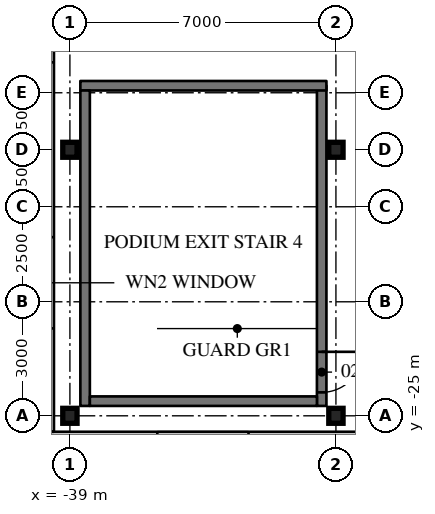
"""IFC4 building model, lengths in metres.
Left out: names, types, materials, properties, quantities, classifications, styles, units other than length and angle.
Written with IfcOpenShell. Run it as: python <this file> out.ifc"""

import sys

from ifc_helpers import new_model, si_unit, direction, frame, frame_2d, origin, origin_2d, place, context, subcontext, project, spatial, rectangle, i_section, extrude, element, fill, save


model = new_model("IFC4")
c1 = context("Model", 3, precision=1e-05, world=origin(), true_north=direction((0.0, 1.0)))
c2 = subcontext(c1, "Body", "Model", "MODEL_VIEW")
j1 = project(units=[si_unit("LENGTHUNIT", "METRE"), si_unit("PLANEANGLEUNIT", "RADIAN")], contexts=[c1])
p1 = place(None, origin())
s1 = spatial("IfcSite", under=j1, at=p1, CompositionType="ELEMENT")
p2 = place(p1, origin())
s2 = spatial("IfcBuilding", under=s1, at=p2, CompositionType="ELEMENT")
p3 = place(p2, frame((0.0, 0.0, 11.0)))
s3 = spatial("IfcBuildingStorey", under=s2, at=p3, CompositionType="ELEMENT", Elevation=11.0)
for number, where, z_axis, x_axis in (
    (1, (-39.0, -25.0, 0.0), (0.0, 0.0, 1.0), (0.0, 1.0, 0.0)),
    (2, (-39.0, -18.0, 0.0), (0.0, 0.0, 1.0), (0.0, 1.0, 0.0)),
    (3, (-32.0, -25.0, 0.0), (0.0, 0.0, 1.0), (0.0, 1.0, 0.0)),
    (4, (-32.0, -18.0, 0.0), (0.0, 0.0, 1.0), (0.0, 1.0, 0.0)),
):
    element("IfcColumn", number, at=place(p3, frame(where, z_axis=z_axis, x_axis=x_axis)), inside=s3, PredefinedType="COLUMN", context=c2, shape_type="SweptSolid", body=[
        extrude(i_section(OverallWidth=0.394, OverallDepth=0.376, WebThickness=0.017, FlangeThickness=0.028, at=origin_2d()), origin(), (0.0, 0.0, 1.0), 5.0),
    ])
p4 = place(p3, frame((-39.82, -25.62, -0.19), z_axis=(0.0, 0.0, 1.0), x_axis=(1.0, 0.0, 0.0)))
e5 = element("IfcWall", 5, at=p4, inside=s3, PredefinedType="SOLIDWALL", context=c2, shape_type="SweptSolid", body=[
    extrude(rectangle(XDim=79.64, YDim=0.4, at=frame_2d((39.82, 0.0))), origin(), (0.0, 0.0, 1.0), 5.0),
])
p5 = place(p4, frame((3.12, 0.0, 1.09)))
e6 = element("IfcOpeningElement", 6, at=p5, cuts=e5, PredefinedType="OPENING", context=c2, shape_type="SweptSolid", body=[
    extrude(rectangle(XDim=2.4, YDim=2.7, at=frame_2d((1.2, 1.35))), frame((0.0, 0.21, 0.0), z_axis=(0.0, -1.0, 0.0), x_axis=(1.0, 0.0, 0.0)), (0.0, 0.0, 1.0), 0.42),
])
p6 = place(p4, frame((10.12, 0.0, 1.09)))
e7 = element("IfcOpeningElement", 7, at=p6, cuts=e5, PredefinedType="OPENING", context=c2, shape_type="SweptSolid", body=[
    extrude(rectangle(XDim=2.4, YDim=2.7, at=frame_2d((1.2, 1.35))), frame((0.0, 0.21, 0.0), z_axis=(0.0, -1.0, 0.0), x_axis=(1.0, 0.0, 0.0)), (0.0, 0.0, 1.0), 0.42),
])
p7 = place(p4, frame((17.12, 0.0, 1.09)))
e8 = element("IfcOpeningElement", 8, at=p7, cuts=e5, PredefinedType="OPENING", context=c2, shape_type="SweptSolid", body=[
    extrude(rectangle(XDim=2.4, YDim=2.7, at=frame_2d((1.2, 1.35))), frame((0.0, 0.21, 0.0), z_axis=(0.0, -1.0, 0.0), x_axis=(1.0, 0.0, 0.0)), (0.0, 0.0, 1.0), 0.42),
])
p8 = place(p4, frame((24.12, 0.0, 1.09)))
e9 = element("IfcOpeningElement", 9, at=p8, cuts=e5, PredefinedType="OPENING", context=c2, shape_type="SweptSolid", body=[
    extrude(rectangle(XDim=2.4, YDim=2.7, at=frame_2d((1.2, 1.35))), frame((0.0, 0.21, 0.0), z_axis=(0.0, -1.0, 0.0), x_axis=(1.0, 0.0, 0.0)), (0.0, 0.0, 1.0), 0.42),
])
p9 = place(p4, frame((33.12, 0.0, 1.09)))
e10 = element("IfcOpeningElement", 10, at=p9, cuts=e5, PredefinedType="OPENING", context=c2, shape_type="SweptSolid", body=[
    extrude(rectangle(XDim=2.4, YDim=2.7, at=frame_2d((1.2, 1.35))), frame((0.0, 0.21, 0.0), z_axis=(0.0, -1.0, 0.0), x_axis=(1.0, 0.0, 0.0)), (0.0, 0.0, 1.0), 0.42),
])
p10 = place(p4, frame((44.12, 0.0, 1.09)))
e11 = element("IfcOpeningElement", 11, at=p10, cuts=e5, PredefinedType="OPENING", context=c2, shape_type="SweptSolid", body=[
    extrude(rectangle(XDim=2.4, YDim=2.7, at=frame_2d((1.2, 1.35))), frame((0.0, 0.21, 0.0), z_axis=(0.0, -1.0, 0.0), x_axis=(1.0, 0.0, 0.0)), (0.0, 0.0, 1.0), 0.42),
])
p11 = place(p4, frame((53.12, 0.0, 1.09)))
e12 = element("IfcOpeningElement", 12, at=p11, cuts=e5, PredefinedType="OPENING", context=c2, shape_type="SweptSolid", body=[
    extrude(rectangle(XDim=2.4, YDim=2.7, at=frame_2d((1.2, 1.35))), frame((0.0, 0.21, 0.0), z_axis=(0.0, -1.0, 0.0), x_axis=(1.0, 0.0, 0.0)), (0.0, 0.0, 1.0), 0.42),
])
p12 = place(p4, frame((60.12, 0.0, 1.09)))
e13 = element("IfcOpeningElement", 13, at=p12, cuts=e5, PredefinedType="OPENING", context=c2, shape_type="SweptSolid", body=[
    extrude(rectangle(XDim=2.4, YDim=2.7, at=frame_2d((1.2, 1.35))), frame((0.0, 0.21, 0.0), z_axis=(0.0, -1.0, 0.0), x_axis=(1.0, 0.0, 0.0)), (0.0, 0.0, 1.0), 0.42),
])
p13 = place(p4, frame((67.12, 0.0, 1.09)))
e14 = element("IfcOpeningElement", 14, at=p13, cuts=e5, PredefinedType="OPENING", context=c2, shape_type="SweptSolid", body=[
    extrude(rectangle(XDim=2.4, YDim=2.7, at=frame_2d((1.2, 1.35))), frame((0.0, 0.21, 0.0), z_axis=(0.0, -1.0, 0.0), x_axis=(1.0, 0.0, 0.0)), (0.0, 0.0, 1.0), 0.42),
])
p14 = place(p4, frame((74.12, 0.0, 1.09)))
e15 = element("IfcOpeningElement", 15, at=p14, cuts=e5, PredefinedType="OPENING", context=c2, shape_type="SweptSolid", body=[
    extrude(rectangle(XDim=2.4, YDim=2.7, at=frame_2d((1.2, 1.35))), frame((0.0, 0.21, 0.0), z_axis=(0.0, -1.0, 0.0), x_axis=(1.0, 0.0, 0.0)), (0.0, 0.0, 1.0), 0.42),
])
p15 = place(p3, frame((-39.62, 25.42, -0.19), z_axis=(0.0, 0.0, 1.0), x_axis=(0.0, -1.0, 0.0)))
e16 = element("IfcWall", 16, at=p15, inside=s3, PredefinedType="SOLIDWALL", context=c2, shape_type="SweptSolid", body=[
    extrude(rectangle(XDim=50.84, YDim=0.4, at=frame_2d((25.42, 0.0))), origin(), (0.0, 0.0, 1.0), 5.0),
])
p16 = place(p15, frame((45.72, 0.0, 1.09)))
e17 = element("IfcOpeningElement", 17, at=p16, cuts=e16, PredefinedType="OPENING", context=c2, shape_type="SweptSolid", body=[
    extrude(rectangle(XDim=2.4, YDim=2.7, at=frame_2d((1.2, 1.35))), frame((0.0, 0.21, 0.0), z_axis=(0.0, -1.0, 0.0), x_axis=(1.0, 0.0, 0.0)), (0.0, 0.0, 1.0), 0.42),
])
p17 = place(p15, frame((38.72, 0.0, 1.09)))
e18 = element("IfcOpeningElement", 18, at=p17, cuts=e16, PredefinedType="OPENING", context=c2, shape_type="SweptSolid", body=[
    extrude(rectangle(XDim=2.4, YDim=2.7, at=frame_2d((1.2, 1.35))), frame((0.0, 0.21, 0.0), z_axis=(0.0, -1.0, 0.0), x_axis=(1.0, 0.0, 0.0)), (0.0, 0.0, 1.0), 0.42),
])
p18 = place(p15, frame((29.72, 0.0, 1.09)))
e19 = element("IfcOpeningElement", 19, at=p18, cuts=e16, PredefinedType="OPENING", context=c2, shape_type="SweptSolid", body=[
    extrude(rectangle(XDim=2.4, YDim=2.7, at=frame_2d((1.2, 1.35))), frame((0.0, 0.21, 0.0), z_axis=(0.0, -1.0, 0.0), x_axis=(1.0, 0.0, 0.0)), (0.0, 0.0, 1.0), 0.42),
])
p19 = place(p15, frame((18.72, 0.0, 1.09)))
e20 = element("IfcOpeningElement", 20, at=p19, cuts=e16, PredefinedType="OPENING", context=c2, shape_type="SweptSolid", body=[
    extrude(rectangle(XDim=2.4, YDim=2.7, at=frame_2d((1.2, 1.35))), frame((0.0, 0.21, 0.0), z_axis=(0.0, -1.0, 0.0), x_axis=(1.0, 0.0, 0.0)), (0.0, 0.0, 1.0), 0.42),
])
p20 = place(p15, frame((9.72, 0.0, 1.09)))
e21 = element("IfcOpeningElement", 21, at=p20, cuts=e16, PredefinedType="OPENING", context=c2, shape_type="SweptSolid", body=[
    extrude(rectangle(XDim=2.4, YDim=2.7, at=frame_2d((1.2, 1.35))), frame((0.0, 0.21, 0.0), z_axis=(0.0, -1.0, 0.0), x_axis=(1.0, 0.0, 0.0)), (0.0, 0.0, 1.0), 0.42),
])
p21 = place(p15, frame((2.72, 0.0, 1.09)))
e22 = element("IfcOpeningElement", 22, at=p21, cuts=e16, PredefinedType="OPENING", context=c2, shape_type="SweptSolid", body=[
    extrude(rectangle(XDim=2.4, YDim=2.7, at=frame_2d((1.2, 1.35))), frame((0.0, 0.21, 0.0), z_axis=(0.0, -1.0, 0.0), x_axis=(1.0, 0.0, 0.0)), (0.0, 0.0, 1.0), 0.42),
])
p22 = place(p3, frame((-32.375, -16.315, 0.0), z_axis=(0.0, 0.0, 1.0), x_axis=(0.0, -1.0, 0.0)))
e23 = element("IfcWall", 23, at=p22, inside=s3, PredefinedType="SOLIDWALL", context=c2, shape_type="SweptSolid", body=[
    extrude(rectangle(XDim=8.425, YDim=0.25, at=frame_2d((4.212, 0.0))), origin(), (0.0, 0.0, 1.0), 4.81),
])
p23 = place(p22, frame((7.001, 0.0, 0.0)))
e24 = element("IfcOpeningElement", 24, at=p23, cuts=e23, PredefinedType="OPENING", context=c2, shape_type="SweptSolid", body=[
    extrude(rectangle(XDim=1.067, YDim=2.134, at=frame_2d((0.533, 1.067))), frame((0.0, 0.135, 0.0), z_axis=(0.0, -1.0, 0.0), x_axis=(1.0, 0.0, 0.0)), (0.0, 0.0, 1.0), 0.27),
])
p24 = place(p3, frame((-32.25, -16.315, 0.0), z_axis=(0.0, 0.0, 1.0), x_axis=(-1.0, 0.0, 0.0)))
e25 = element("IfcWall", 25, at=p24, inside=s3, PredefinedType="SOLIDWALL", context=c2, shape_type="SweptSolid", body=[
    extrude(rectangle(XDim=6.475, YDim=0.25, at=frame_2d((3.238, 0.0))), origin(), (0.0, 0.0, 1.0), 4.81),
])
p25 = place(p3, frame((-38.6, -16.44, 0.0), z_axis=(0.0, 0.0, 1.0), x_axis=(0.0, -1.0, 0.0)))
e26 = element("IfcWall", 26, at=p25, inside=s3, PredefinedType="SOLIDWALL", context=c2, shape_type="SweptSolid", body=[
    extrude(rectangle(XDim=8.3, YDim=0.25, at=frame_2d((4.15, 0.0))), origin(), (0.0, 0.0, 1.0), 4.81),
])
p26 = place(p3, frame((-32.5, -24.615, 0.0), z_axis=(0.0, 0.0, 1.0), x_axis=(-1.0, 0.0, 0.0)))
e27 = element("IfcWall", 27, at=p26, inside=s3, PredefinedType="SOLIDWALL", context=c2, shape_type="SweptSolid", body=[
    extrude(rectangle(XDim=5.975, YDim=0.25, at=frame_2d((2.988, 0.0))), origin(), (0.0, 0.0, 1.0), 4.81),
])
p27 = place(p23, origin())
e28 = element("IfcDoor", 28, at=p27, inside=s3, OperationType="SINGLE_SWING_LEFT", PredefinedType="DOOR", context=c2, shape_type="SweptSolid", body=[
    extrude(rectangle(XDim=1.067, YDim=2.134, at=frame_2d((0.533, 1.067))), frame((0.0, 0.025, 0.0), z_axis=(0.0, -1.0, 0.0), x_axis=(1.0, 0.0, 0.0)), (0.0, 0.0, 1.0), 0.05),
])
fill(e24, e28)
save(model, sys.argv[1])
